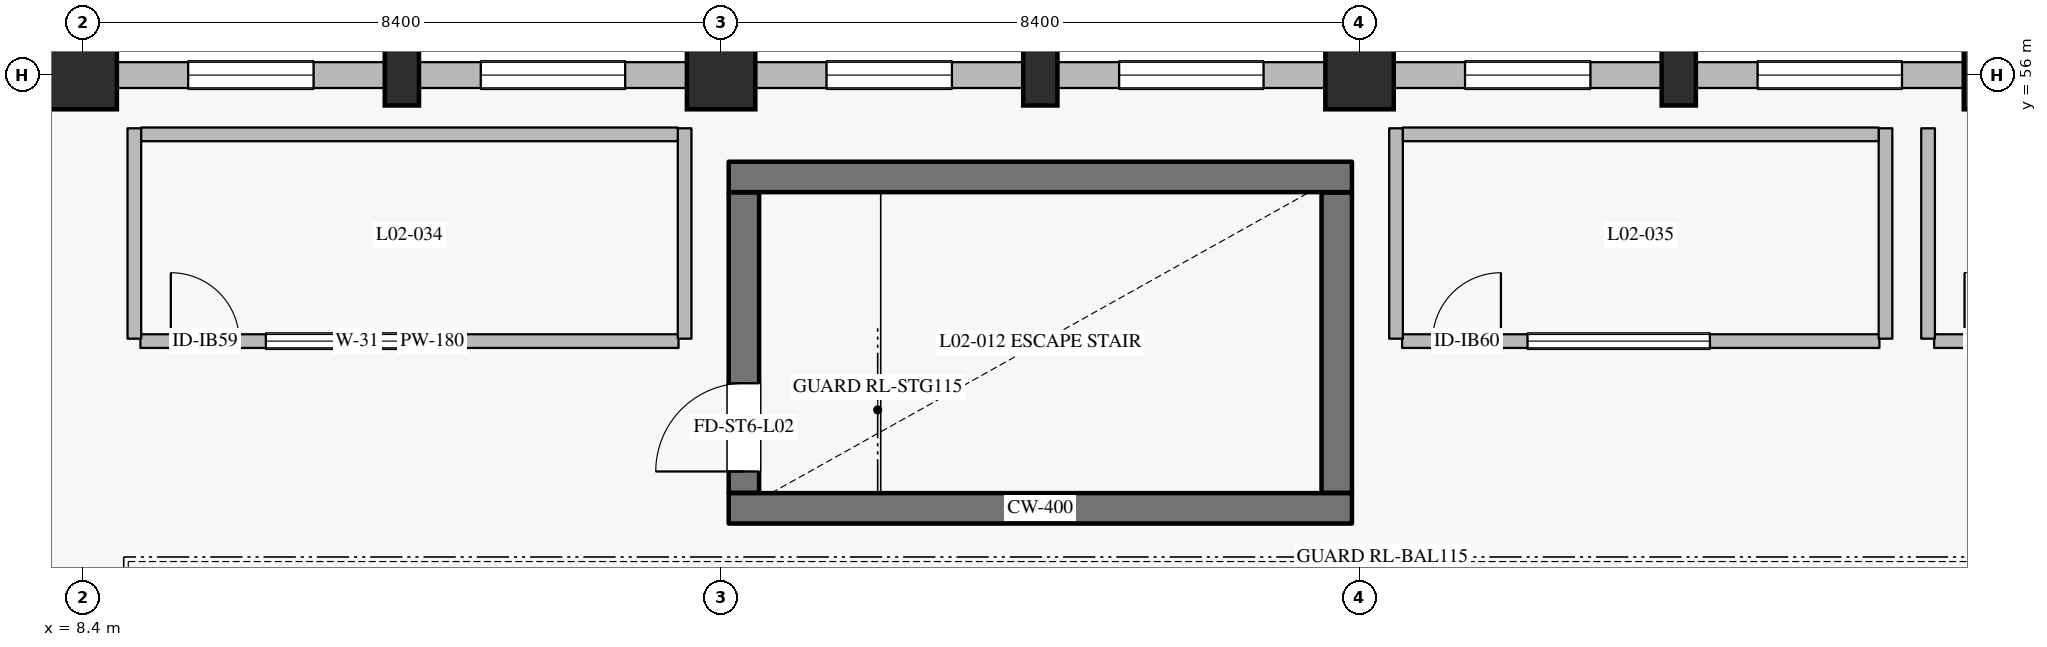
"""IFC4 building model, lengths in metres.
Left out: names, types, materials, properties, quantities, classifications, styles, units other than length and angle.
Written with IfcOpenShell. Run it as: python <this file> out.ifc"""

import sys

from ifc_helpers import new_model, si_unit, direction, frame, frame_2d, origin, origin_2d, place, context, subcontext, project, spatial, rectangle, extrude, element, fill, save


model = new_model("IFC4")
c1 = context("Model", 3, precision=1e-05, world=origin(), true_north=direction((0.0, 1.0)))
c2 = subcontext(c1, "Body", "Model", "MODEL_VIEW")
j1 = project(units=[si_unit("LENGTHUNIT", "METRE"), si_unit("PLANEANGLEUNIT", "RADIAN")], contexts=[c1])
p1 = place(None, origin())
s1 = spatial("IfcSite", under=j1, at=p1, CompositionType="ELEMENT")
p2 = place(p1, origin())
s2 = spatial("IfcBuilding", under=s1, at=p2, CompositionType="ELEMENT")
p3 = place(p2, frame((0.0, 0.0, 11.4)))
s3 = spatial("IfcBuildingStorey", under=s2, at=p3, CompositionType="ELEMENT", Elevation=11.4)
p4 = place(p3, frame((8.4, 56.0, 0.0), z_axis=(0.0, 0.0, 1.0), x_axis=(1.0, 0.0, 0.0)))
e1 = element("IfcColumn", 1, at=p4, inside=s3, PredefinedType="COLUMN", context=c2, shape_type="SweptSolid", body=[
    extrude(rectangle(XDim=0.9, YDim=0.9, at=origin_2d()), origin(), (0.0, 0.0, 1.0), 4.8),
])
p5 = place(p3, frame((12.6, 56.0, 0.0), z_axis=(0.0, 0.0, 1.0), x_axis=(1.0, 0.0, 0.0)))
e2 = element("IfcColumn", 2, at=p5, inside=s3, PredefinedType="PILASTER", context=c2, shape_type="SweptSolid", body=[
    extrude(rectangle(XDim=0.45, YDim=0.8, at=origin_2d()), origin(), (0.0, 0.0, 1.0), 4.8),
])
p6 = place(p3, frame((16.8, 56.0, 0.0), z_axis=(0.0, 0.0, 1.0), x_axis=(1.0, 0.0, 0.0)))
e3 = element("IfcColumn", 3, at=p6, inside=s3, PredefinedType="COLUMN", context=c2, shape_type="SweptSolid", body=[
    extrude(rectangle(XDim=0.9, YDim=0.9, at=origin_2d()), origin(), (0.0, 0.0, 1.0), 4.8),
])
p7 = place(p3, frame((21.0, 56.0, 0.0), z_axis=(0.0, 0.0, 1.0), x_axis=(1.0, 0.0, 0.0)))
e4 = element("IfcColumn", 4, at=p7, inside=s3, PredefinedType="PILASTER", context=c2, shape_type="SweptSolid", body=[
    extrude(rectangle(XDim=0.45, YDim=0.8, at=origin_2d()), origin(), (0.0, 0.0, 1.0), 4.8),
])
p8 = place(p3, frame((25.2, 56.0, 0.0), z_axis=(0.0, 0.0, 1.0), x_axis=(1.0, 0.0, 0.0)))
e5 = element("IfcColumn", 5, at=p8, inside=s3, PredefinedType="COLUMN", context=c2, shape_type="SweptSolid", body=[
    extrude(rectangle(XDim=0.9, YDim=0.9, at=origin_2d()), origin(), (0.0, 0.0, 1.0), 4.8),
])
p9 = place(p3, frame((29.4, 56.0, 0.0), z_axis=(0.0, 0.0, 1.0), x_axis=(1.0, 0.0, 0.0)))
e6 = element("IfcColumn", 6, at=p9, inside=s3, PredefinedType="PILASTER", context=c2, shape_type="SweptSolid", body=[
    extrude(rectangle(XDim=0.45, YDim=0.8, at=origin_2d()), origin(), (0.0, 0.0, 1.0), 4.8),
])
p10 = place(p3, frame((33.6, 56.0, 0.0), z_axis=(0.0, 0.0, 1.0), x_axis=(1.0, 0.0, 0.0)))
e7 = element("IfcColumn", 7, at=p10, inside=s3, PredefinedType="COLUMN", context=c2, shape_type="SweptSolid", body=[
    extrude(rectangle(XDim=0.9, YDim=0.9, at=origin_2d()), origin(), (0.0, 0.0, 1.0), 4.8),
])
p11 = place(p3, frame((8.85, 56.0, 0.0), z_axis=(0.0, 0.0, 1.0), x_axis=(1.0, 0.0, 0.0)))
e8 = element("IfcWall", 8, at=p11, inside=s3, PredefinedType="SOLIDWALL", context=c2, shape_type="SweptSolid", body=[
    extrude(rectangle(XDim=3.525, YDim=0.34, at=frame_2d((1.762, 0.0))), origin(), (0.0, 0.0, 1.0), 3.6),
])
p12 = place(p11, frame((0.938, 0.0, 1.25)))
e9 = element("IfcOpeningElement", 9, at=p12, cuts=e8, PredefinedType="OPENING", context=c2, shape_type="SweptSolid", body=[
    extrude(rectangle(XDim=1.65, YDim=1.35, at=frame_2d((0.825, 0.675))), frame((0.0, 0.18, 0.0), z_axis=(0.0, -1.0, 0.0), x_axis=(1.0, 0.0, 0.0)), (0.0, 0.0, 1.0), 0.36),
])
p13 = place(p3, frame((12.825, 56.0, 0.0), z_axis=(0.0, 0.0, 1.0), x_axis=(1.0, 0.0, 0.0)))
e10 = element("IfcWall", 10, at=p13, inside=s3, PredefinedType="SOLIDWALL", context=c2, shape_type="SweptSolid", body=[
    extrude(rectangle(XDim=3.525, YDim=0.34, at=frame_2d((1.763, 0.0))), origin(), (0.0, 0.0, 1.0), 3.6),
])
p14 = place(p13, frame((0.813, 0.0, 1.25)))
e11 = element("IfcOpeningElement", 11, at=p14, cuts=e10, PredefinedType="OPENING", context=c2, shape_type="SweptSolid", body=[
    extrude(rectangle(XDim=1.9, YDim=1.4, at=frame_2d((0.95, 0.7))), frame((0.0, 0.18, 0.0), z_axis=(0.0, -1.0, 0.0), x_axis=(1.0, 0.0, 0.0)), (0.0, 0.0, 1.0), 0.36),
])
p15 = place(p3, frame((17.25, 56.0, 0.0), z_axis=(0.0, 0.0, 1.0), x_axis=(1.0, 0.0, 0.0)))
e12 = element("IfcWall", 12, at=p15, inside=s3, PredefinedType="SOLIDWALL", context=c2, shape_type="SweptSolid", body=[
    extrude(rectangle(XDim=3.525, YDim=0.34, at=frame_2d((1.762, 0.0))), origin(), (0.0, 0.0, 1.0), 3.6),
])
p16 = place(p15, frame((0.937, 0.0, 1.25)))
e13 = element("IfcOpeningElement", 13, at=p16, cuts=e12, PredefinedType="OPENING", context=c2, shape_type="SweptSolid", body=[
    extrude(rectangle(XDim=1.65, YDim=1.35, at=frame_2d((0.825, 0.675))), frame((0.0, 0.18, 0.0), z_axis=(0.0, -1.0, 0.0), x_axis=(1.0, 0.0, 0.0)), (0.0, 0.0, 1.0), 0.36),
])
p17 = place(p3, frame((21.225, 56.0, 0.0), z_axis=(0.0, 0.0, 1.0), x_axis=(1.0, 0.0, 0.0)))
e14 = element("IfcWall", 14, at=p17, inside=s3, PredefinedType="SOLIDWALL", context=c2, shape_type="SweptSolid", body=[
    extrude(rectangle(XDim=3.525, YDim=0.34, at=frame_2d((1.762, 0.0))), origin(), (0.0, 0.0, 1.0), 3.6),
])
p18 = place(p17, frame((0.812, 0.0, 1.25)))
e15 = element("IfcOpeningElement", 15, at=p18, cuts=e14, PredefinedType="OPENING", context=c2, shape_type="SweptSolid", body=[
    extrude(rectangle(XDim=1.9, YDim=1.4, at=frame_2d((0.95, 0.7))), frame((0.0, 0.18, 0.0), z_axis=(0.0, -1.0, 0.0), x_axis=(1.0, 0.0, 0.0)), (0.0, 0.0, 1.0), 0.36),
])
p19 = place(p3, frame((25.65, 56.0, 0.0), z_axis=(0.0, 0.0, 1.0), x_axis=(1.0, 0.0, 0.0)))
e16 = element("IfcWall", 16, at=p19, inside=s3, PredefinedType="SOLIDWALL", context=c2, shape_type="SweptSolid", body=[
    extrude(rectangle(XDim=3.525, YDim=0.34, at=frame_2d((1.763, 0.0))), origin(), (0.0, 0.0, 1.0), 3.6),
])
p20 = place(p19, frame((0.938, 0.0, 1.25)))
e17 = element("IfcOpeningElement", 17, at=p20, cuts=e16, PredefinedType="OPENING", context=c2, shape_type="SweptSolid", body=[
    extrude(rectangle(XDim=1.65, YDim=1.35, at=frame_2d((0.825, 0.675))), frame((0.0, 0.18, 0.0), z_axis=(0.0, -1.0, 0.0), x_axis=(1.0, 0.0, 0.0)), (0.0, 0.0, 1.0), 0.36),
])
p21 = place(p3, frame((29.625, 56.0, 0.0), z_axis=(0.0, 0.0, 1.0), x_axis=(1.0, 0.0, 0.0)))
e18 = element("IfcWall", 18, at=p21, inside=s3, PredefinedType="SOLIDWALL", context=c2, shape_type="SweptSolid", body=[
    extrude(rectangle(XDim=3.525, YDim=0.34, at=frame_2d((1.762, 0.0))), origin(), (0.0, 0.0, 1.0), 3.6),
])
p22 = place(p21, frame((0.812, 0.0, 1.25)))
e19 = element("IfcOpeningElement", 19, at=p22, cuts=e18, PredefinedType="OPENING", context=c2, shape_type="SweptSolid", body=[
    extrude(rectangle(XDim=1.9, YDim=1.4, at=frame_2d((0.95, 0.7))), frame((0.0, 0.18, 0.0), z_axis=(0.0, -1.0, 0.0), x_axis=(1.0, 0.0, 0.0)), (0.0, 0.0, 1.0), 0.36),
])
p23 = place(p3, frame((16.9, 50.3, 0.0), z_axis=(0.0, 0.0, 1.0), x_axis=(1.0, 0.0, 0.0)))
e20 = element("IfcWall", 20, at=p23, inside=s3, PredefinedType="SHEAR", context=c2, shape_type="SweptSolid", body=[
    extrude(rectangle(XDim=8.2, YDim=0.4, at=frame_2d((4.1, 0.0))), origin(), (0.0, 0.0, 1.0), 4.535),
])
p24 = place(p3, frame((24.9, 50.505, 0.0), z_axis=(0.0, 0.0, 1.0), x_axis=(0.0, 1.0, 0.0)))
e21 = element("IfcWall", 21, at=p24, inside=s3, PredefinedType="SHEAR", context=c2, shape_type="SweptSolid", body=[
    extrude(rectangle(XDim=3.95, YDim=0.4, at=frame_2d((1.975, 0.0))), origin(), (0.0, 0.0, 1.0), 4.535),
])
p25 = place(p3, frame((16.9, 54.66, 0.0), z_axis=(0.0, 0.0, 1.0), x_axis=(1.0, 0.0, 0.0)))
e22 = element("IfcWall", 22, at=p25, inside=s3, PredefinedType="SHEAR", context=c2, shape_type="SweptSolid", body=[
    extrude(rectangle(XDim=8.2, YDim=0.4, at=frame_2d((4.1, 0.0))), origin(), (0.0, 0.0, 1.0), 4.535),
])
p26 = place(p3, frame((17.1, 50.505, 0.0), z_axis=(0.0, 0.0, 1.0), x_axis=(0.0, 1.0, 0.0)))
e23 = element("IfcWall", 23, at=p26, inside=s3, PredefinedType="SHEAR", context=c2, shape_type="SweptSolid", body=[
    extrude(rectangle(XDim=3.95, YDim=0.4, at=frame_2d((1.975, 0.0))), origin(), (0.0, 0.0, 1.0), 4.535),
])
p27 = place(p26, frame((0.28, 0.0, 0.0)))
e24 = element("IfcOpeningElement", 24, at=p27, cuts=e23, PredefinedType="OPENING", context=c2, shape_type="SweptSolid", body=[
    extrude(rectangle(XDim=1.16, YDim=2.2, at=frame_2d((0.58, 1.1))), frame((0.0, 0.21, 0.0), z_axis=(0.0, -1.0, 0.0), x_axis=(1.0, 0.0, 0.0)), (0.0, 0.0, 1.0), 0.42),
])
p28 = place(p3, frame((9.16, 52.5, 0.0), z_axis=(0.0, 0.0, 1.0), x_axis=(1.0, 0.0, 0.0)))
e25 = element("IfcWall", 25, at=p28, inside=s3, PredefinedType="PARTITIONING", context=c2, shape_type="SweptSolid", body=[
    extrude(rectangle(XDim=7.08, YDim=0.18, at=frame_2d((3.54, 0.0))), origin(), (0.0, 0.0, 1.0), 4.535),
])
p29 = place(p28, frame((0.4, 0.0, 0.0)))
e26 = element("IfcOpeningElement", 26, at=p29, cuts=e25, PredefinedType="OPENING", context=c2, shape_type="SweptSolid", body=[
    extrude(rectangle(XDim=0.9, YDim=2.1, at=frame_2d((0.45, 1.05))), frame((0.0, 0.1, 0.0), z_axis=(0.0, -1.0, 0.0), x_axis=(1.0, 0.0, 0.0)), (0.0, 0.0, 1.0), 0.2),
])
p30 = place(p28, frame((1.65, 0.0, 0.9)))
e27 = element("IfcOpeningElement", 27, at=p30, cuts=e25, PredefinedType="OPENING", context=c2, shape_type="SweptSolid", body=[
    extrude(rectangle(XDim=2.4, YDim=1.3, at=frame_2d((1.2, 0.65))), frame((0.0, 0.1, 0.0), z_axis=(0.0, -1.0, 0.0), x_axis=(1.0, 0.0, 0.0)), (0.0, 0.0, 1.0), 0.2),
])
p31 = place(p3, frame((25.76, 52.5, 0.0), z_axis=(0.0, 0.0, 1.0), x_axis=(1.0, 0.0, 0.0)))
e28 = element("IfcWall", 28, at=p31, inside=s3, PredefinedType="PARTITIONING", context=c2, shape_type="SweptSolid", body=[
    extrude(rectangle(XDim=6.28, YDim=0.18, at=frame_2d((3.14, 0.0))), origin(), (0.0, 0.0, 1.0), 4.535),
])
p32 = place(p31, frame((0.4, 0.0, 0.0)))
e29 = element("IfcOpeningElement", 29, at=p32, cuts=e28, PredefinedType="OPENING", context=c2, shape_type="SweptSolid", body=[
    extrude(rectangle(XDim=0.9, YDim=2.1, at=frame_2d((0.45, 1.05))), frame((0.0, 0.1, 0.0), z_axis=(0.0, -1.0, 0.0), x_axis=(1.0, 0.0, 0.0)), (0.0, 0.0, 1.0), 0.2),
])
p33 = place(p31, frame((1.65, 0.0, 0.9)))
e30 = element("IfcOpeningElement", 30, at=p33, cuts=e28, PredefinedType="OPENING", context=c2, shape_type="SweptSolid", body=[
    extrude(rectangle(XDim=2.4, YDim=1.3, at=frame_2d((1.2, 0.65))), frame((0.0, 0.1, 0.0), z_axis=(0.0, -1.0, 0.0), x_axis=(1.0, 0.0, 0.0)), (0.0, 0.0, 1.0), 0.2),
])
p34 = place(p3, frame((32.76, 52.5, 0.0), z_axis=(0.0, 0.0, 1.0), x_axis=(1.0, 0.0, 0.0)))
e31 = element("IfcWall", 31, at=p34, inside=s3, PredefinedType="PARTITIONING", context=c2, shape_type="SweptSolid", body=[
    extrude(rectangle(XDim=6.28, YDim=0.18, at=frame_2d((3.14, 0.0))), origin(), (0.0, 0.0, 1.0), 4.535),
])
p35 = place(p34, frame((0.4, 0.0, 0.0)))
e32 = element("IfcOpeningElement", 32, at=p35, cuts=e31, PredefinedType="OPENING", context=c2, shape_type="SweptSolid", body=[
    extrude(rectangle(XDim=0.9, YDim=2.1, at=frame_2d((0.45, 1.05))), frame((0.0, 0.1, 0.0), z_axis=(0.0, -1.0, 0.0), x_axis=(1.0, 0.0, 0.0)), (0.0, 0.0, 1.0), 0.2),
])
p36 = place(p34, frame((1.65, 0.0, 0.9)))
e33 = element("IfcOpeningElement", 33, at=p36, cuts=e31, PredefinedType="OPENING", context=c2, shape_type="SweptSolid", body=[
    extrude(rectangle(XDim=2.4, YDim=1.3, at=frame_2d((1.2, 0.65))), frame((0.0, 0.1, 0.0), z_axis=(0.0, -1.0, 0.0), x_axis=(1.0, 0.0, 0.0)), (0.0, 0.0, 1.0), 0.2),
])
for number, where, z_axis, x_axis in (
    (34, (9.08, 52.532, 0.0), (0.0, 0.0, 1.0), (0.0, 1.0, 0.0)),
    (35, (16.32, 52.532, 0.0), (0.0, 0.0, 1.0), (0.0, 1.0, 0.0)),
):
    element("IfcWall", number, at=place(p3, frame(where, z_axis=z_axis, x_axis=x_axis)), inside=s3, PredefinedType="PARTITIONING", context=c2, shape_type="SweptSolid", body=[
        extrude(rectangle(XDim=2.768, YDim=0.18, at=frame_2d((1.384, 0.0))), origin(), (0.0, 0.0, 1.0), 4.535),
    ])
p37 = place(p3, frame((9.17, 55.22, 0.0), z_axis=(0.0, 0.0, 1.0), x_axis=(1.0, 0.0, 0.0)))
e36 = element("IfcWall", 36, at=p37, inside=s3, PredefinedType="PARTITIONING", context=c2, shape_type="SweptSolid", body=[
    extrude(rectangle(XDim=7.06, YDim=0.18, at=frame_2d((3.53, 0.0))), origin(), (0.0, 0.0, 1.0), 4.535),
])
for number, where, z_axis, x_axis in (
    (37, (25.68, 52.532, 0.0), (0.0, 0.0, 1.0), (0.0, 1.0, 0.0)),
    (38, (32.12, 52.532, 0.0), (0.0, 0.0, 1.0), (0.0, 1.0, 0.0)),
):
    element("IfcWall", number, at=place(p3, frame(where, z_axis=z_axis, x_axis=x_axis)), inside=s3, PredefinedType="PARTITIONING", context=c2, shape_type="SweptSolid", body=[
        extrude(rectangle(XDim=2.768, YDim=0.18, at=frame_2d((1.384, 0.0))), origin(), (0.0, 0.0, 1.0), 4.535),
    ])
p38 = place(p3, frame((25.77, 55.22, 0.0), z_axis=(0.0, 0.0, 1.0), x_axis=(1.0, 0.0, 0.0)))
e39 = element("IfcWall", 39, at=p38, inside=s3, PredefinedType="PARTITIONING", context=c2, shape_type="SweptSolid", body=[
    extrude(rectangle(XDim=6.26, YDim=0.18, at=frame_2d((3.13, 0.0))), origin(), (0.0, 0.0, 1.0), 4.535),
])
p39 = place(p3, frame((32.68, 52.532, 0.0), z_axis=(0.0, 0.0, 1.0), x_axis=(0.0, 1.0, 0.0)))
e40 = element("IfcWall", 40, at=p39, inside=s3, PredefinedType="PARTITIONING", context=c2, shape_type="SweptSolid", body=[
    extrude(rectangle(XDim=2.768, YDim=0.18, at=frame_2d((1.384, 0.0))), origin(), (0.0, 0.0, 1.0), 4.535),
])
p40 = place(p12, origin())
e41 = element("IfcWindow", 41, at=p40, inside=s3, PartitioningType="SINGLE_PANEL", PredefinedType="WINDOW", context=c2, shape_type="SweptSolid", body=[
    extrude(rectangle(XDim=1.65, YDim=1.35, at=frame_2d((0.825, 0.675))), frame((0.0, 0.03, 0.0), z_axis=(0.0, -1.0, 0.0), x_axis=(1.0, 0.0, 0.0)), (0.0, 0.0, 1.0), 0.06),
])
fill(e9, e41)
p41 = place(p14, origin())
e42 = element("IfcWindow", 42, at=p41, inside=s3, PartitioningType="DOUBLE_PANEL_VERTICAL", PredefinedType="WINDOW", context=c2, shape_type="SweptSolid", body=[
    extrude(rectangle(XDim=1.9, YDim=1.4, at=frame_2d((0.95, 0.7))), frame((0.0, 0.03, 0.0), z_axis=(0.0, -1.0, 0.0), x_axis=(1.0, 0.0, 0.0)), (0.0, 0.0, 1.0), 0.06),
])
fill(e11, e42)
p42 = place(p16, origin())
e43 = element("IfcWindow", 43, at=p42, inside=s3, PartitioningType="SINGLE_PANEL", PredefinedType="WINDOW", context=c2, shape_type="SweptSolid", body=[
    extrude(rectangle(XDim=1.65, YDim=1.35, at=frame_2d((0.825, 0.675))), frame((0.0, 0.03, 0.0), z_axis=(0.0, -1.0, 0.0), x_axis=(1.0, 0.0, 0.0)), (0.0, 0.0, 1.0), 0.06),
])
fill(e13, e43)
p43 = place(p18, origin())
e44 = element("IfcWindow", 44, at=p43, inside=s3, PartitioningType="DOUBLE_PANEL_VERTICAL", PredefinedType="WINDOW", context=c2, shape_type="SweptSolid", body=[
    extrude(rectangle(XDim=1.9, YDim=1.4, at=frame_2d((0.95, 0.7))), frame((0.0, 0.03, 0.0), z_axis=(0.0, -1.0, 0.0), x_axis=(1.0, 0.0, 0.0)), (0.0, 0.0, 1.0), 0.06),
])
fill(e15, e44)
p44 = place(p20, origin())
e45 = element("IfcWindow", 45, at=p44, inside=s3, PartitioningType="SINGLE_PANEL", PredefinedType="WINDOW", context=c2, shape_type="SweptSolid", body=[
    extrude(rectangle(XDim=1.65, YDim=1.35, at=frame_2d((0.825, 0.675))), frame((0.0, 0.03, 0.0), z_axis=(0.0, -1.0, 0.0), x_axis=(1.0, 0.0, 0.0)), (0.0, 0.0, 1.0), 0.06),
])
fill(e17, e45)
p45 = place(p22, origin())
e46 = element("IfcWindow", 46, at=p45, inside=s3, PartitioningType="DOUBLE_PANEL_VERTICAL", PredefinedType="WINDOW", context=c2, shape_type="SweptSolid", body=[
    extrude(rectangle(XDim=1.9, YDim=1.4, at=frame_2d((0.95, 0.7))), frame((0.0, 0.03, 0.0), z_axis=(0.0, -1.0, 0.0), x_axis=(1.0, 0.0, 0.0)), (0.0, 0.0, 1.0), 0.06),
])
fill(e19, e46)
p46 = place(p27, origin())
e47 = element("IfcDoor", 47, at=p46, inside=s3, OperationType="SINGLE_SWING_LEFT", PredefinedType="DOOR", context=c2, shape_type="SweptSolid", body=[
    extrude(rectangle(XDim=1.16, YDim=2.2, at=frame_2d((0.58, 1.1))), frame((0.0, 0.025, 0.0), z_axis=(0.0, -1.0, 0.0), x_axis=(1.0, 0.0, 0.0)), (0.0, 0.0, 1.0), 0.05),
])
fill(e24, e47)
p47 = place(p29, origin())
e48 = element("IfcDoor", 48, at=p47, inside=s3, OperationType="SINGLE_SWING_LEFT", PredefinedType="DOOR", context=c2, shape_type="SweptSolid", body=[
    extrude(rectangle(XDim=0.9, YDim=2.1, at=frame_2d((0.45, 1.05))), frame((0.0, 0.025, 0.0), z_axis=(0.0, -1.0, 0.0), x_axis=(1.0, 0.0, 0.0)), (0.0, 0.0, 1.0), 0.05),
])
fill(e26, e48)
p48 = place(p30, origin())
e49 = element("IfcWindow", 49, at=p48, inside=s3, PartitioningType="DOUBLE_PANEL_VERTICAL", PredefinedType="WINDOW", context=c2, shape_type="SweptSolid", body=[
    extrude(rectangle(XDim=2.4, YDim=1.3, at=frame_2d((1.2, 0.65))), frame((0.0, 0.03, 0.0), z_axis=(0.0, -1.0, 0.0), x_axis=(1.0, 0.0, 0.0)), (0.0, 0.0, 1.0), 0.06),
])
fill(e27, e49)
p49 = place(p32, origin())
e50 = element("IfcDoor", 50, at=p49, inside=s3, OperationType="SINGLE_SWING_RIGHT", PredefinedType="DOOR", context=c2, shape_type="SweptSolid", body=[
    extrude(rectangle(XDim=0.9, YDim=2.1, at=frame_2d((0.45, 1.05))), frame((0.0, 0.025, 0.0), z_axis=(0.0, -1.0, 0.0), x_axis=(1.0, 0.0, 0.0)), (0.0, 0.0, 1.0), 0.05),
])
fill(e29, e50)
p50 = place(p33, origin())
e51 = element("IfcWindow", 51, at=p50, inside=s3, PartitioningType="DOUBLE_PANEL_VERTICAL", PredefinedType="WINDOW", context=c2, shape_type="SweptSolid", body=[
    extrude(rectangle(XDim=2.4, YDim=1.3, at=frame_2d((1.2, 0.65))), frame((0.0, 0.03, 0.0), z_axis=(0.0, -1.0, 0.0), x_axis=(1.0, 0.0, 0.0)), (0.0, 0.0, 1.0), 0.06),
])
fill(e30, e51)
p51 = place(p35, origin())
e52 = element("IfcDoor", 52, at=p51, inside=s3, OperationType="SINGLE_SWING_LEFT", PredefinedType="DOOR", context=c2, shape_type="SweptSolid", body=[
    extrude(rectangle(XDim=0.9, YDim=2.1, at=frame_2d((0.45, 1.05))), frame((0.0, 0.025, 0.0), z_axis=(0.0, -1.0, 0.0), x_axis=(1.0, 0.0, 0.0)), (0.0, 0.0, 1.0), 0.05),
])
fill(e32, e52)
save(model, sys.argv[1])
